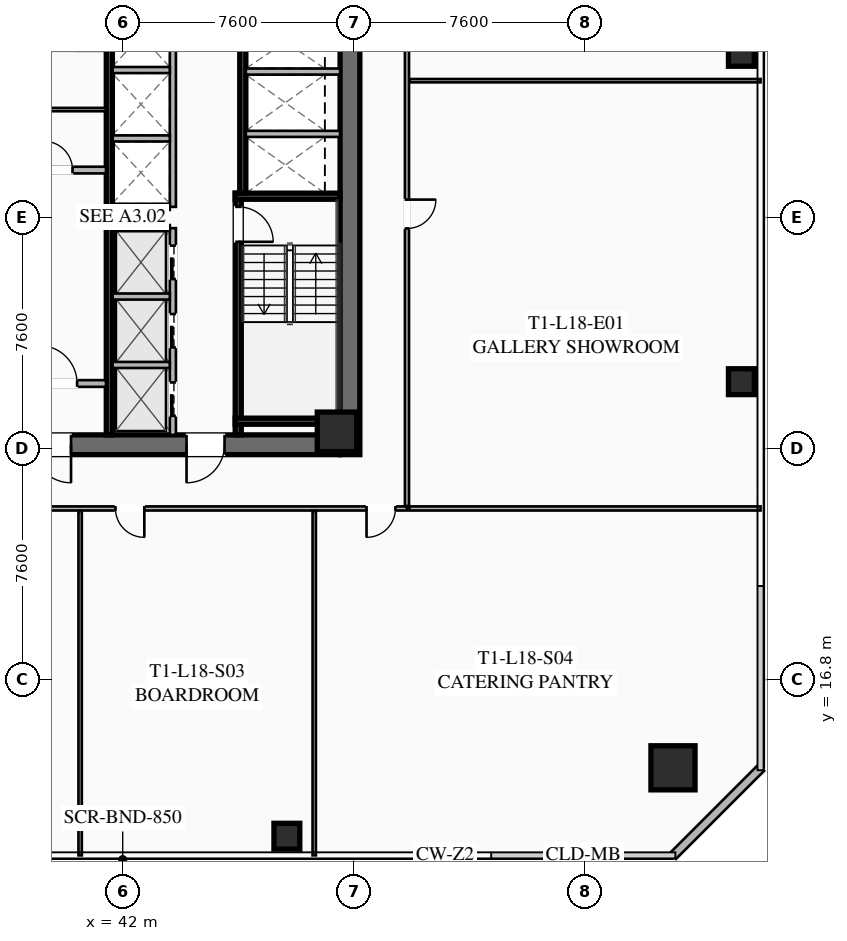
"""IFC4 building model, lengths in metres.
Left out: names, types, materials, properties, quantities, classifications, styles, units other than length and angle.
Written with IfcOpenShell. Run it as: python <this file> out.ifc"""

import sys

from ifc_helpers import new_model, si_unit, direction, frame, frame_2d, origin, origin_2d, place, context, subcontext, project, spatial, rectangle, hollow_rectangle, extrude, element, fill, save


model = new_model("IFC4")
c1 = context("Model", 3, precision=1e-05, world=origin(), true_north=direction((0.0, 1.0)))
c2 = subcontext(c1, "Body", "Model", "MODEL_VIEW")
j1 = project(units=[si_unit("LENGTHUNIT", "METRE"), si_unit("PLANEANGLEUNIT", "RADIAN")], contexts=[c1])
p1 = place(None, origin())
s1 = spatial("IfcSite", under=j1, at=p1, CompositionType="ELEMENT")
p2 = place(p1, origin())
s2 = spatial("IfcBuilding", under=s1, at=p2, CompositionType="ELEMENT")
p3 = place(p2, frame((0.0, 0.0, 70.75)))
s3 = spatial("IfcBuildingStorey", under=s2, at=p3, CompositionType="ELEMENT", Elevation=70.75)
p4 = place(p3, frame((49.475, 39.8, 0.0), z_axis=(0.0, 0.0, 1.0), x_axis=(0.0, -1.0, 0.0)))
e1 = element("IfcWall", 1, at=p4, inside=s3, PredefinedType="SHEAR", context=c2, shape_type="SweptSolid", body=[
    extrude(rectangle(XDim=15.6, YDim=0.65, at=frame_2d((7.8, 0.0))), origin(), (0.0, 0.0, 1.0), 3.55),
])
p5 = place(p3, frame((49.15, 24.525, 0.0), z_axis=(0.0, 0.0, 1.0), x_axis=(-1.0, 0.0, 0.0)))
e2 = element("IfcWall", 2, at=p5, inside=s3, PredefinedType="SHEAR", context=c2, shape_type="SweptSolid", body=[
    extrude(rectangle(XDim=14.3, YDim=0.65, at=frame_2d((7.15, 0.0))), origin(), (0.0, 0.0, 1.0), 3.55),
])
p6 = place(p5, frame((8.85, 0.0, 0.0)))
e3 = element("IfcOpeningElement", 3, at=p6, cuts=e2, PredefinedType="OPENING", context=c2, shape_type="SweptSolid", body=[
    extrude(rectangle(XDim=1.25, YDim=2.25, at=frame_2d((0.625, 1.125))), frame((0.0, 0.335, 0.0), z_axis=(0.0, -1.0, 0.0), x_axis=(1.0, 0.0, 0.0)), (0.0, 0.0, 1.0), 0.67),
])
p7 = place(p5, frame((3.8, 0.0, 0.0)))
e4 = element("IfcOpeningElement", 4, at=p7, cuts=e2, PredefinedType="OPENING", context=c2, shape_type="SweptSolid", body=[
    extrude(rectangle(XDim=1.25, YDim=2.25, at=frame_2d((0.625, 1.125))), frame((0.0, 0.335, 0.0), z_axis=(0.0, -1.0, 0.0), x_axis=(1.0, 0.0, 0.0)), (0.0, 0.0, 1.0), 0.67),
])
p8 = place(p3, frame((49.05, 24.95, 0.0), z_axis=(0.0, 0.0, 1.0), x_axis=(1.0, 0.0, 0.0)))
e5 = element("IfcColumn", 5, at=p8, inside=s3, PredefinedType="COLUMN", context=c2, shape_type="SweptSolid", body=[
    extrude(hollow_rectangle(XDim=1.3, YDim=1.3, WallThickness=0.05, at=origin_2d()), origin(), (0.0, 0.0, 1.0), 3.35),
])
p9 = place(p3, frame((60.1, 13.9, 0.0), z_axis=(0.0, 0.0, 1.0), x_axis=(1.0, 0.0, 0.0)))
e6 = element("IfcColumn", 6, at=p9, inside=s3, PredefinedType="COLUMN", context=c2, shape_type="SweptSolid", body=[
    extrude(hollow_rectangle(XDim=1.45, YDim=1.45, WallThickness=0.055, at=origin_2d()), origin(), (0.0, 0.0, 1.0), 3.35),
])
for number, where, z_axis, x_axis in (
    (7, (47.4, 11.65, 0.0), (0.0, 0.0, 1.0), (1.0, 0.0, 0.0)),
    (8, (62.35, 26.6, 0.0), (0.0, 0.0, 1.0), (1.0, 0.0, 0.0)),
    (9, (62.35, 37.4, 0.0), (0.0, 0.0, 1.0), (1.0, 0.0, 0.0)),
):
    element("IfcColumn", number, at=place(p3, frame(where, z_axis=z_axis, x_axis=x_axis)), inside=s3, PredefinedType="COLUMN", context=c2, shape_type="SweptSolid", body=[
        extrude(hollow_rectangle(XDim=0.85, YDim=0.85, WallThickness=0.035, at=origin_2d()), origin(), (0.0, 0.0, 1.0), 3.35),
    ])
p10 = place(p3, frame((63.0, 13.9, 0.0), z_axis=(0.0, 0.0, 1.0), x_axis=(-0.707106781187, -0.707106781187, 0.0)))
e10 = element("IfcWall", 10, at=p10, inside=s3, PredefinedType="SOLIDWALL", context=c2, shape_type="SweptSolid", body=[
    extrude(rectangle(XDim=4.101, YDim=0.28, at=frame_2d((2.051, 0.0))), origin(), (0.0, 0.0, 1.0), 3.35),
])
p11 = place(p3, frame((45.8, 32.8, 0.0), z_axis=(0.0, 0.0, 1.0), x_axis=(0.0, -1.0, 0.0)))
e11 = element("IfcWall", 11, at=p11, inside=s3, PredefinedType="SHEAR", context=c2, shape_type="SweptSolid", body=[
    extrude(rectangle(XDim=7.95, YDim=0.2, at=frame_2d((3.975, 0.0))), origin(), (0.0, 0.0, 1.0), 3.35),
])
p12 = place(p11, frame((0.45, 0.0, 0.0)))
e12 = element("IfcOpeningElement", 12, at=p12, cuts=e11, PredefinedType="OPENING", context=c2, shape_type="SweptSolid", body=[
    extrude(rectangle(XDim=1.15, YDim=2.2, at=frame_2d((0.575, 1.1))), frame((0.0, 0.11, 0.0), z_axis=(0.0, -1.0, 0.0), x_axis=(1.0, 0.0, 0.0)), (0.0, 0.0, 1.0), 0.22),
])
for number, where, z_axis, x_axis in (
    (13, (45.7, 32.7, 0.0), (0.0, 0.0, 1.0), (1.0, 0.0, 0.0)),
    (14, (45.7, 25.3, 0.0), (0.0, 0.0, 1.0), (1.0, 0.0, 0.0)),
):
    element("IfcWall", number, at=place(p3, frame(where, z_axis=z_axis, x_axis=x_axis)), inside=s3, PredefinedType="SHEAR", context=c2, shape_type="SweptSolid", body=[
        extrude(rectangle(XDim=3.45, YDim=0.2, at=frame_2d((1.725, 0.0))), origin(), (0.0, 0.0, 1.0), 3.35),
    ])
p13 = place(p3, frame((41.56, 24.85, 0.0), z_axis=(0.0, 0.0, 1.0), x_axis=(0.0, 1.0, 0.0)))
e15 = element("IfcWall", 15, at=p13, inside=s3, PredefinedType="SHEAR", context=c2, shape_type="SweptSolid", body=[
    extrude(rectangle(XDim=14.3, YDim=0.2, at=frame_2d((7.15, 0.0))), origin(), (0.0, 0.0, 1.0), 3.35),
])
p14 = place(p3, frame((38.3, 33.56, 0.0), z_axis=(0.0, 0.0, 1.0), x_axis=(1.0, 0.0, 0.0)))
e16 = element("IfcWall", 16, at=p14, inside=s3, PredefinedType="SOLIDWALL", context=c2, shape_type="SweptSolid", body=[
    extrude(rectangle(XDim=3.15, YDim=0.22, at=frame_2d((1.575, 0.0))), origin(), (0.0, 0.0, 1.0), 2.703),
])
p15 = place(p14, frame((1.1, 0.0, 0.0)))
e17 = element("IfcOpeningElement", 17, at=p15, cuts=e16, PredefinedType="OPENING", context=c2, shape_type="SweptSolid", body=[
    extrude(rectangle(XDim=0.95, YDim=2.05, at=frame_2d((0.475, 1.025))), frame((0.0, 0.12, 0.0), z_axis=(0.0, -1.0, 0.0), x_axis=(1.0, 0.0, 0.0)), (0.0, 0.0, 1.0), 0.24),
])
p16 = place(p3, frame((38.3, 26.54, 0.0), z_axis=(0.0, 0.0, 1.0), x_axis=(1.0, 0.0, 0.0)))
e18 = element("IfcWall", 18, at=p16, inside=s3, PredefinedType="SOLIDWALL", context=c2, shape_type="SweptSolid", body=[
    extrude(rectangle(XDim=3.15, YDim=0.22, at=frame_2d((1.575, 0.0))), origin(), (0.0, 0.0, 1.0), 2.703),
])
p17 = place(p16, frame((0.95, 0.0, 0.0)))
e19 = element("IfcOpeningElement", 19, at=p17, cuts=e18, PredefinedType="OPENING", context=c2, shape_type="SweptSolid", body=[
    extrude(rectangle(XDim=1.25, YDim=2.25, at=frame_2d((0.625, 1.125))), frame((0.0, 0.12, 0.0), z_axis=(0.0, -1.0, 0.0), x_axis=(1.0, 0.0, 0.0)), (0.0, 0.0, 1.0), 0.24),
])
p18 = place(p3, frame((45.95, 39.15, 0.0), z_axis=(0.0, 0.0, 1.0), x_axis=(0.0, -1.0, 0.0)))
e20 = element("IfcWall", 20, at=p18, inside=s3, PredefinedType="SHEAR", context=c2, shape_type="SweptSolid", body=[
    extrude(rectangle(XDim=6.35, YDim=0.2, at=frame_2d((3.175, 0.0))), origin(), (0.0, 0.0, 1.0), 3.35),
])
for number, where, z_axis, x_axis in (
    (21, (46.05, 34.75, 0.0), (0.0, 0.0, 1.0), (1.0, 0.0, 0.0)),
    (22, (46.05, 36.8, 0.0), (0.0, 0.0, 1.0), (1.0, 0.0, 0.0)),
):
    element("IfcWall", number, at=place(p3, frame(where, z_axis=z_axis, x_axis=x_axis)), inside=s3, PredefinedType="SOLIDWALL", context=c2, shape_type="SweptSolid", body=[
        extrude(rectangle(XDim=3.1, YDim=0.2, at=frame_2d((1.55, 0.0))), origin(), (0.0, 0.0, 1.0), 3.35),
    ])
p19 = place(p3, frame((38.3, 35.55, 0.0), z_axis=(0.0, 0.0, 1.0), x_axis=(1.0, 0.0, 0.0)))
e23 = element("IfcWall", 23, at=p19, inside=s3, PredefinedType="PARTITIONING", context=c2, shape_type="SweptSolid", body=[
    extrude(rectangle(XDim=3.15, YDim=0.11, at=frame_2d((1.575, 0.0))), origin(), (0.0, 0.0, 1.0), 2.703),
])
p20 = place(p3, frame((43.65, 24.85, 0.0), z_axis=(0.0, 0.0, 1.0), x_axis=(0.0, 1.0, 0.0)))
e24 = element("IfcWall", 24, at=p20, inside=s3, PredefinedType="SOLIDWALL", context=c2, shape_type="SweptSolid", body=[
    extrude(rectangle(XDim=6.8, YDim=0.2, at=frame_2d((3.4, 0.0))), origin(), (0.0, 0.0, 1.0), 3.35),
])
p21 = place(p20, frame((0.625, 0.0, 0.0)))
e25 = element("IfcOpeningElement", 25, at=p21, cuts=e24, PredefinedType="OPENING", context=c2, shape_type="SweptSolid", body=[
    extrude(rectangle(XDim=1.1, YDim=2.2, at=frame_2d((0.55, 1.1))), frame((0.0, 0.11, 0.0), z_axis=(0.0, -1.0, 0.0), x_axis=(1.0, 0.0, 0.0)), (0.0, 0.0, 1.0), 0.22),
])
p22 = place(p20, frame((2.875, 0.0, 0.0)))
e26 = element("IfcOpeningElement", 26, at=p22, cuts=e24, PredefinedType="OPENING", context=c2, shape_type="SweptSolid", body=[
    extrude(rectangle(XDim=1.1, YDim=2.2, at=frame_2d((0.55, 1.1))), frame((0.0, 0.11, 0.0), z_axis=(0.0, -1.0, 0.0), x_axis=(1.0, 0.0, 0.0)), (0.0, 0.0, 1.0), 0.22),
])
p23 = place(p20, frame((5.125, 0.0, 0.0)))
e27 = element("IfcOpeningElement", 27, at=p23, cuts=e24, PredefinedType="OPENING", context=c2, shape_type="SweptSolid", body=[
    extrude(rectangle(XDim=1.1, YDim=2.2, at=frame_2d((0.55, 1.1))), frame((0.0, 0.11, 0.0), z_axis=(0.0, -1.0, 0.0), x_axis=(1.0, 0.0, 0.0)), (0.0, 0.0, 1.0), 0.22),
])
for number, where, z_axis, x_axis in (
    (28, (41.67, 27.15, 0.0), (0.0, 0.0, 1.0), (1.0, 0.0, 0.0)),
    (29, (41.67, 29.4, 0.0), (0.0, 0.0, 1.0), (1.0, 0.0, 0.0)),
    (30, (41.67, 31.65, 0.0), (0.0, 0.0, 1.0), (1.0, 0.0, 0.0)),
):
    element("IfcWall", number, at=place(p3, frame(where, z_axis=z_axis, x_axis=x_axis)), inside=s3, PredefinedType="SOLIDWALL", context=c2, shape_type="SweptSolid", body=[
        extrude(rectangle(XDim=1.88, YDim=0.2, at=frame_2d((0.94, 0.0))), origin(), (0.0, 0.0, 1.0), 3.35),
    ])
p24 = place(p3, frame((43.65, 32.35, 0.0), z_axis=(0.0, 0.0, 1.0), x_axis=(0.0, 1.0, 0.0)))
e31 = element("IfcWall", 31, at=p24, inside=s3, PredefinedType="SOLIDWALL", context=c2, shape_type="SweptSolid", body=[
    extrude(rectangle(XDim=6.8, YDim=0.2, at=frame_2d((3.4, 0.0))), origin(), (0.0, 0.0, 1.0), 3.35),
])
for number, where, z_axis, x_axis in (
    (32, (41.67, 32.35, 0.0), (0.0, 0.0, 1.0), (1.0, 0.0, 0.0)),
    (33, (41.67, 34.6, 0.0), (0.0, 0.0, 1.0), (1.0, 0.0, 0.0)),
    (34, (41.67, 36.85, 0.0), (0.0, 0.0, 1.0), (1.0, 0.0, 0.0)),
):
    element("IfcWall", number, at=place(p3, frame(where, z_axis=z_axis, x_axis=x_axis)), inside=s3, PredefinedType="SOLIDWALL", context=c2, shape_type="SweptSolid", body=[
        extrude(rectangle(XDim=1.88, YDim=0.2, at=frame_2d((0.94, 0.0))), origin(), (0.0, 0.0, 1.0), 3.35),
    ])
p25 = place(p3, frame((51.35, 22.43, 0.0), z_axis=(0.0, 0.0, 1.0), x_axis=(-1.0, 0.0, 0.0)))
e35 = element("IfcWall", 35, at=p25, inside=s3, PredefinedType="PARTITIONING", context=c2, shape_type="SweptSolid", body=[
    extrude(rectangle(XDim=27.3, YDim=0.135, at=frame_2d((13.65, 0.0))), origin(), (0.0, 0.0, 1.0), 2.703),
])
p26 = place(p25, frame((25.97, 0.0, 0.0)))
e36 = element("IfcOpeningElement", 36, at=p26, cuts=e35, PredefinedType="OPENING", context=c2, shape_type="SweptSolid", body=[
    extrude(rectangle(XDim=0.95, YDim=2.05, at=frame_2d((0.475, 1.025))), frame((0.0, 0.077, 0.0), z_axis=(0.0, -1.0, 0.0), x_axis=(1.0, 0.0, 0.0)), (0.0, 0.0, 1.0), 0.155),
])
p27 = place(p25, frame((12.698, 0.0, 0.0)))
e37 = element("IfcOpeningElement", 37, at=p27, cuts=e35, PredefinedType="OPENING", context=c2, shape_type="SweptSolid", body=[
    extrude(rectangle(XDim=0.95, YDim=2.05, at=frame_2d((0.475, 1.025))), frame((0.0, 0.077, 0.0), z_axis=(0.0, -1.0, 0.0), x_axis=(1.0, 0.0, 0.0)), (0.0, 0.0, 1.0), 0.155),
])
p28 = place(p25, frame((8.639, 0.0, 0.0)))
e38 = element("IfcOpeningElement", 38, at=p28, cuts=e35, PredefinedType="OPENING", context=c2, shape_type="SweptSolid", body=[
    extrude(rectangle(XDim=0.95, YDim=2.05, at=frame_2d((0.475, 1.025))), frame((0.0, 0.077, 0.0), z_axis=(0.0, -1.0, 0.0), x_axis=(1.0, 0.0, 0.0)), (0.0, 0.0, 1.0), 0.155),
])
p29 = place(p25, frame((0.38, 0.0, 0.0)))
e39 = element("IfcOpeningElement", 39, at=p29, cuts=e35, PredefinedType="OPENING", context=c2, shape_type="SweptSolid", body=[
    extrude(rectangle(XDim=0.95, YDim=2.05, at=frame_2d((0.475, 1.025))), frame((0.0, 0.077, 0.0), z_axis=(0.0, -1.0, 0.0), x_axis=(1.0, 0.0, 0.0)), (0.0, 0.0, 1.0), 0.155),
])
for number, where, z_axis, x_axis in (
    (40, (40.6, 11.02, 0.0), (0.0, 0.0, 1.0), (0.0, 1.0, 0.0)),
    (41, (48.3, 11.02, 0.0), (0.0, 0.0, 1.0), (0.0, 1.0, 0.0)),
):
    element("IfcWall", number, at=place(p3, frame(where, z_axis=z_axis, x_axis=x_axis)), inside=s3, PredefinedType="PARTITIONING", context=c2, shape_type="SweptSolid", body=[
        extrude(rectangle(XDim=11.33, YDim=0.11, at=frame_2d((5.665, 0.0))), origin(), (0.0, 0.0, 1.0), 2.703),
    ])
p30 = place(p3, frame((51.35, 42.77, 0.0), z_axis=(0.0, 0.0, 1.0), x_axis=(0.0, -1.0, 0.0)))
e42 = element("IfcWall", 42, at=p30, inside=s3, PredefinedType="PARTITIONING", context=c2, shape_type="SweptSolid", body=[
    extrude(rectangle(XDim=20.26, YDim=0.135, at=frame_2d((10.13, 0.0))), origin(), (0.0, 0.0, 1.0), 2.703),
])
p31 = place(p30, frame((10.181, 0.0, 0.0)))
e43 = element("IfcOpeningElement", 43, at=p31, cuts=e42, PredefinedType="OPENING", context=c2, shape_type="SweptSolid", body=[
    extrude(rectangle(XDim=0.95, YDim=2.05, at=frame_2d((0.475, 1.025))), frame((0.0, 0.077, 0.0), z_axis=(0.0, -1.0, 0.0), x_axis=(1.0, 0.0, 0.0)), (0.0, 0.0, 1.0), 0.155),
])
p32 = place(p30, frame((0.3, 0.0, 0.0)))
e44 = element("IfcOpeningElement", 44, at=p32, cuts=e42, PredefinedType="OPENING", context=c2, shape_type="SweptSolid", body=[
    extrude(rectangle(XDim=0.95, YDim=2.05, at=frame_2d((0.475, 1.025))), frame((0.0, 0.077, 0.0), z_axis=(0.0, -1.0, 0.0), x_axis=(1.0, 0.0, 0.0)), (0.0, 0.0, 1.0), 0.155),
])
p33 = place(p3, frame((51.43, 22.43, 0.0), z_axis=(0.0, 0.0, 1.0), x_axis=(1.0, 0.0, 0.0)))
e45 = element("IfcWall", 45, at=p33, inside=s3, PredefinedType="PARTITIONING", context=c2, shape_type="SweptSolid", body=[
    extrude(rectangle(XDim=11.55, YDim=0.135, at=frame_2d((5.775, 0.0))), origin(), (0.0, 0.0, 1.0), 2.703),
])
p34 = place(p3, frame((51.43, 36.5, 0.0), z_axis=(0.0, 0.0, 1.0), x_axis=(1.0, 0.0, 0.0)))
e46 = element("IfcWall", 46, at=p34, inside=s3, PredefinedType="PARTITIONING", context=c2, shape_type="SweptSolid", body=[
    extrude(rectangle(XDim=11.55, YDim=0.11, at=frame_2d((5.775, 0.0))), origin(), (0.0, 0.0, 1.0), 2.703),
])
p35 = place(p6, origin())
e47 = element("IfcDoor", 47, at=p35, inside=s3, OperationType="SINGLE_SWING_LEFT", PredefinedType="DOOR", context=c2, shape_type="SweptSolid", body=[
    extrude(rectangle(XDim=1.25, YDim=2.25, at=frame_2d((0.625, 1.125))), frame((0.0, 0.025, 0.0), z_axis=(0.0, -1.0, 0.0), x_axis=(1.0, 0.0, 0.0)), (0.0, 0.0, 1.0), 0.05),
])
fill(e3, e47)
p36 = place(p7, origin())
e48 = element("IfcDoor", 48, at=p36, inside=s3, OperationType="SINGLE_SWING_RIGHT", PredefinedType="DOOR", context=c2, shape_type="SweptSolid", body=[
    extrude(rectangle(XDim=1.25, YDim=2.25, at=frame_2d((0.625, 1.125))), frame((0.0, 0.025, 0.0), z_axis=(0.0, -1.0, 0.0), x_axis=(1.0, 0.0, 0.0)), (0.0, 0.0, 1.0), 0.05),
])
fill(e4, e48)
p37 = place(p12, origin())
e49 = element("IfcDoor", 49, at=p37, inside=s3, OperationType="SINGLE_SWING_RIGHT", PredefinedType="DOOR", context=c2, shape_type="SweptSolid", body=[
    extrude(rectangle(XDim=1.15, YDim=2.2, at=frame_2d((0.575, 1.1))), frame((0.0, 0.025, 0.0), z_axis=(0.0, -1.0, 0.0), x_axis=(1.0, 0.0, 0.0)), (0.0, 0.0, 1.0), 0.05),
])
fill(e12, e49)
p38 = place(p17, origin())
e50 = element("IfcDoor", 50, at=p38, inside=s3, OperationType="SINGLE_SWING_LEFT", PredefinedType="DOOR", context=c2, shape_type="SweptSolid", body=[
    extrude(rectangle(XDim=1.25, YDim=2.25, at=frame_2d((0.625, 1.125))), frame((0.0, 0.025, 0.0), z_axis=(0.0, -1.0, 0.0), x_axis=(1.0, 0.0, 0.0)), (0.0, 0.0, 1.0), 0.05),
])
fill(e19, e50)
p39 = place(p15, origin())
e51 = element("IfcDoor", 51, at=p39, inside=s3, OperationType="SINGLE_SWING_LEFT", PredefinedType="DOOR", context=c2, shape_type="SweptSolid", body=[
    extrude(rectangle(XDim=0.95, YDim=2.05, at=frame_2d((0.475, 1.025))), frame((0.0, 0.025, 0.0), z_axis=(0.0, -1.0, 0.0), x_axis=(1.0, 0.0, 0.0)), (0.0, 0.0, 1.0), 0.05),
])
fill(e17, e51)
p40 = place(p28, origin())
e52 = element("IfcDoor", 52, at=p40, inside=s3, OperationType="SINGLE_SWING_LEFT", PredefinedType="DOOR", context=c2, shape_type="SweptSolid", body=[
    extrude(rectangle(XDim=0.95, YDim=2.05, at=frame_2d((0.475, 1.025))), frame((0.0, 0.025, 0.0), z_axis=(0.0, -1.0, 0.0), x_axis=(1.0, 0.0, 0.0)), (0.0, 0.0, 1.0), 0.05),
])
fill(e38, e52)
p41 = place(p29, origin())
e53 = element("IfcDoor", 53, at=p41, inside=s3, OperationType="SINGLE_SWING_RIGHT", PredefinedType="DOOR", context=c2, shape_type="SweptSolid", body=[
    extrude(rectangle(XDim=0.95, YDim=2.05, at=frame_2d((0.475, 1.025))), frame((0.0, 0.025, 0.0), z_axis=(0.0, -1.0, 0.0), x_axis=(1.0, 0.0, 0.0)), (0.0, 0.0, 1.0), 0.05),
])
fill(e39, e53)
p42 = place(p31, origin())
e54 = element("IfcDoor", 54, at=p42, inside=s3, OperationType="SINGLE_SWING_LEFT", PredefinedType="DOOR", context=c2, shape_type="SweptSolid", body=[
    extrude(rectangle(XDim=0.95, YDim=2.05, at=frame_2d((0.475, 1.025))), frame((0.0, 0.025, 0.0), z_axis=(0.0, -1.0, 0.0), x_axis=(1.0, 0.0, 0.0)), (0.0, 0.0, 1.0), 0.05),
])
fill(e43, e54)
p43 = place(p21, origin())
e55 = element("IfcDoor", 55, at=p43, inside=s3, OperationType="SLIDING_TO_LEFT", PredefinedType="DOOR", context=c2, shape_type="SweptSolid", body=[
    extrude(rectangle(XDim=1.1, YDim=2.2, at=frame_2d((0.55, 1.1))), frame((0.0, 0.025, 0.0), z_axis=(0.0, -1.0, 0.0), x_axis=(1.0, 0.0, 0.0)), (0.0, 0.0, 1.0), 0.05),
])
fill(e25, e55)
p44 = place(p22, origin())
e56 = element("IfcDoor", 56, at=p44, inside=s3, OperationType="SLIDING_TO_LEFT", PredefinedType="DOOR", context=c2, shape_type="SweptSolid", body=[
    extrude(rectangle(XDim=1.1, YDim=2.2, at=frame_2d((0.55, 1.1))), frame((0.0, 0.025, 0.0), z_axis=(0.0, -1.0, 0.0), x_axis=(1.0, 0.0, 0.0)), (0.0, 0.0, 1.0), 0.05),
])
fill(e26, e56)
p45 = place(p23, origin())
e57 = element("IfcDoor", 57, at=p45, inside=s3, OperationType="SLIDING_TO_LEFT", PredefinedType="DOOR", context=c2, shape_type="SweptSolid", body=[
    extrude(rectangle(XDim=1.1, YDim=2.2, at=frame_2d((0.55, 1.1))), frame((0.0, 0.025, 0.0), z_axis=(0.0, -1.0, 0.0), x_axis=(1.0, 0.0, 0.0)), (0.0, 0.0, 1.0), 0.05),
])
fill(e27, e57)
save(model, sys.argv[1])
